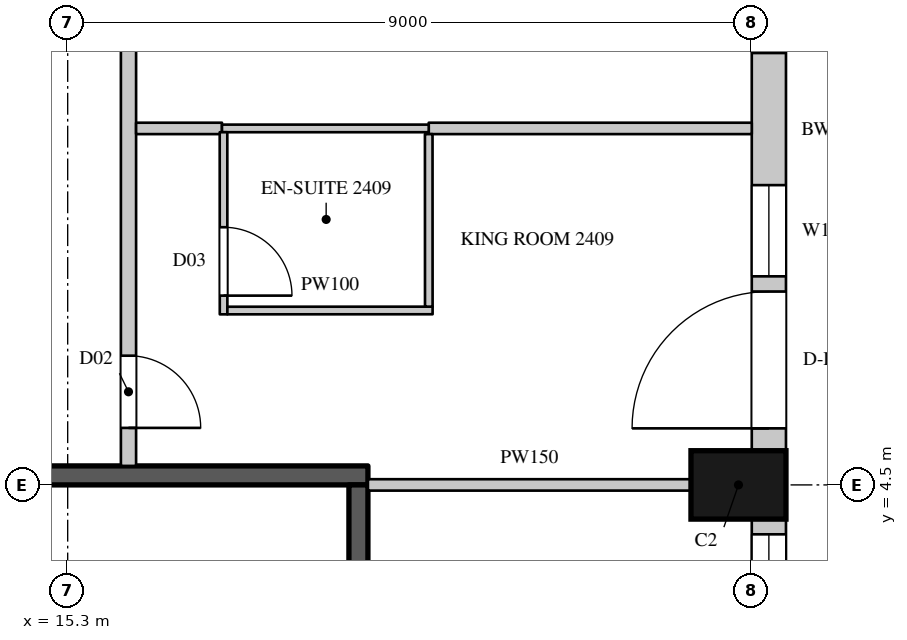
"""IFC4 building model, lengths in metres.
Left out: names, types, materials, properties, quantities, classifications, styles, units other than length and angle.
Written with IfcOpenShell. Run it as: python <this file> out.ifc"""

import sys

from ifc_helpers import new_model, si_unit, direction, frame, frame_2d, origin, origin_2d, place, context, subcontext, project, spatial, rectangle, extrude, element, fill, save


model = new_model("IFC4")
c1 = context("Model", 3, precision=1e-05, world=origin(), true_north=direction((0.0, 1.0)))
c2 = subcontext(c1, "Body", "Model", "MODEL_VIEW")
j1 = project(units=[si_unit("LENGTHUNIT", "METRE"), si_unit("PLANEANGLEUNIT", "RADIAN")], contexts=[c1])
p1 = place(None, origin())
s1 = spatial("IfcSite", under=j1, at=p1, CompositionType="ELEMENT")
p2 = place(p1, origin())
s2 = spatial("IfcBuilding", under=s1, at=p2, CompositionType="ELEMENT")
p3 = place(p2, frame((0.0, 0.0, 116.7)))
s3 = spatial("IfcBuildingStorey", under=s2, at=p3, CompositionType="ELEMENT", Elevation=116.7)
p4 = place(p3, frame((24.125, 4.5, 0.0), z_axis=(0.0, 0.0, 1.0), x_axis=(0.0, 1.0, 0.0)))
e1 = element("IfcColumn", 1, at=p4, inside=s3, PredefinedType="COLUMN", context=c2, shape_type="SweptSolid", body=[
    extrude(rectangle(XDim=0.9, YDim=1.25, at=origin_2d()), origin(), (0.0, 0.0, 1.0), 3.6),
])
p5 = place(p3, frame((24.525, -4.05, 0.0), z_axis=(0.0, 0.0, 1.0), x_axis=(0.0, 1.0, 0.0)))
e2 = element("IfcWall", 2, at=p5, inside=s3, PredefinedType="SOLIDWALL", context=c2, shape_type="SweptSolid", body=[
    extrude(rectangle(XDim=8.1, YDim=0.45, at=frame_2d((4.05, 0.0))), origin(), (0.0, 0.0, 1.0), 3.3),
])
p6 = place(p5, frame((0.2, 0.0, 0.0)))
e3 = element("IfcOpeningElement", 3, at=p6, cuts=e2, PredefinedType="OPENING", context=c2, shape_type="SweptSolid", body=[
    extrude(rectangle(XDim=1.8, YDim=2.4, at=frame_2d((0.9, 1.2))), frame((0.0, 0.235, 0.0), z_axis=(0.0, -1.0, 0.0), x_axis=(1.0, 0.0, 0.0)), (0.0, 0.0, 1.0), 0.47),
])
p7 = place(p5, frame((2.2, 0.0, 1.05)))
e4 = element("IfcOpeningElement", 4, at=p7, cuts=e2, PredefinedType="OPENING", context=c2, shape_type="SweptSolid", body=[
    extrude(rectangle(XDim=1.2, YDim=2.0, at=frame_2d((0.6, 1.0))), frame((0.0, 0.235, 0.0), z_axis=(0.0, -1.0, 0.0), x_axis=(1.0, 0.0, 0.0)), (0.0, 0.0, 1.0), 0.47),
])
p8 = place(p5, frame((4.7, 0.0, 0.0)))
e5 = element("IfcOpeningElement", 5, at=p8, cuts=e2, PredefinedType="OPENING", context=c2, shape_type="SweptSolid", body=[
    extrude(rectangle(XDim=1.8, YDim=2.4, at=frame_2d((0.9, 1.2))), frame((0.0, 0.235, 0.0), z_axis=(0.0, -1.0, 0.0), x_axis=(1.0, 0.0, 0.0)), (0.0, 0.0, 1.0), 0.47),
])
p9 = place(p5, frame((6.7, 0.0, 1.05)))
e6 = element("IfcOpeningElement", 6, at=p9, cuts=e2, PredefinedType="OPENING", context=c2, shape_type="SweptSolid", body=[
    extrude(rectangle(XDim=1.2, YDim=2.0, at=frame_2d((0.6, 1.0))), frame((0.0, 0.235, 0.0), z_axis=(0.0, -1.0, 0.0), x_axis=(1.0, 0.0, 0.0)), (0.0, 0.0, 1.0), 0.47),
])
p10 = place(p3, frame((24.525, 4.95, 0.0), z_axis=(0.0, 0.0, 1.0), x_axis=(0.0, 1.0, 0.0)))
e7 = element("IfcWall", 7, at=p10, inside=s3, PredefinedType="SOLIDWALL", context=c2, shape_type="SweptSolid", body=[
    extrude(rectangle(XDim=8.439, YDim=0.45, at=frame_2d((4.219, 0.0))), origin(), (0.0, 0.0, 1.0), 3.3),
])
p11 = place(p10, frame((0.294, 0.0, 0.0)))
e8 = element("IfcOpeningElement", 8, at=p11, cuts=e7, PredefinedType="OPENING", context=c2, shape_type="SweptSolid", body=[
    extrude(rectangle(XDim=1.8, YDim=2.4, at=frame_2d((0.9, 1.2))), frame((0.0, 0.235, 0.0), z_axis=(0.0, -1.0, 0.0), x_axis=(1.0, 0.0, 0.0)), (0.0, 0.0, 1.0), 0.47),
])
p12 = place(p10, frame((2.294, 0.0, 1.05)))
e9 = element("IfcOpeningElement", 9, at=p12, cuts=e7, PredefinedType="OPENING", context=c2, shape_type="SweptSolid", body=[
    extrude(rectangle(XDim=1.2, YDim=2.0, at=frame_2d((0.6, 1.0))), frame((0.0, 0.235, 0.0), z_axis=(0.0, -1.0, 0.0), x_axis=(1.0, 0.0, 0.0)), (0.0, 0.0, 1.0), 0.47),
])
p13 = place(p10, frame((5.232, 0.0, 1.05)))
e10 = element("IfcOpeningElement", 10, at=p13, cuts=e7, PredefinedType="OPENING", context=c2, shape_type="SweptSolid", body=[
    extrude(rectangle(XDim=2.7, YDim=2.0, at=frame_2d((1.35, 1.0))), frame((0.0, 0.235, 0.0), z_axis=(0.0, -1.0, 0.0), x_axis=(1.0, 0.0, 0.0)), (0.0, 0.0, 1.0), 0.47),
])
p14 = place(p3, frame((16.1, 4.75, 0.0), z_axis=(0.0, 0.0, 1.0), x_axis=(0.0, 1.0, 0.0)))
e11 = element("IfcWall", 11, at=p14, inside=s3, PredefinedType="PARTITIONING", context=c2, shape_type="SweptSolid", body=[
    extrude(rectangle(XDim=12.65, YDim=0.2, at=frame_2d((6.325, 0.0))), origin(), (0.0, 0.0, 1.0), 3.3),
])
p15 = place(p14, frame((0.5, 0.0, 0.0)))
e12 = element("IfcOpeningElement", 12, at=p15, cuts=e11, PredefinedType="OPENING", context=c2, shape_type="SweptSolid", body=[
    extrude(rectangle(XDim=0.95, YDim=2.2, at=frame_2d((0.475, 1.1))), frame((0.0, 0.11, 0.0), z_axis=(0.0, -1.0, 0.0), x_axis=(1.0, 0.0, 0.0)), (0.0, 0.0, 1.0), 0.22),
])
p16 = place(p14, frame((6.9, 0.0, 0.0)))
e13 = element("IfcOpeningElement", 13, at=p16, cuts=e11, PredefinedType="OPENING", context=c2, shape_type="SweptSolid", body=[
    extrude(rectangle(XDim=0.95, YDim=2.2, at=frame_2d((0.475, 1.1))), frame((0.0, 0.11, 0.0), z_axis=(0.0, -1.0, 0.0), x_axis=(1.0, 0.0, 0.0)), (0.0, 0.0, 1.0), 0.22),
])
p17 = place(p3, frame((16.2, 9.19, 0.0), z_axis=(0.0, 0.0, 1.0), x_axis=(1.0, 0.0, 0.0)))
e14 = element("IfcWall", 14, at=p17, inside=s3, PredefinedType="PARTITIONING", context=c2, shape_type="SweptSolid", body=[
    extrude(rectangle(XDim=1.13, YDim=0.15, at=frame_2d((0.565, 0.0))), origin(), (0.0, 0.0, 1.0), 2.65),
])
p18 = place(p3, frame((19.25, 4.5, 0.0), z_axis=(0.0, 0.0, 1.0), x_axis=(1.0, 0.0, 0.0)))
e15 = element("IfcWall", 15, at=p18, inside=s3, PredefinedType="PARTITIONING", context=c2, shape_type="SweptSolid", body=[
    extrude(rectangle(XDim=4.25, YDim=0.15, at=frame_2d((2.125, 0.0))), origin(), (0.0, 0.0, 1.0), 3.3),
])
p19 = place(p3, frame((20.05, 9.19, 0.0), z_axis=(0.0, 0.0, 1.0), x_axis=(1.0, 0.0, 0.0)))
e16 = element("IfcWall", 16, at=p19, inside=s3, PredefinedType="PARTITIONING", context=c2, shape_type="SweptSolid", body=[
    extrude(rectangle(XDim=4.25, YDim=0.15, at=frame_2d((2.125, 0.0))), origin(), (0.0, 0.0, 1.0), 2.65),
])
p20 = place(p3, frame((14.55, 4.625, 0.0), z_axis=(0.0, 0.0, 1.0), x_axis=(1.0, 0.0, 0.0)))
e17 = element("IfcWall", 17, at=p20, inside=s3, PredefinedType="SHEAR", context=c2, shape_type="SweptSolid", body=[
    extrude(rectangle(XDim=4.7, YDim=0.25, at=frame_2d((2.35, 0.0))), origin(), (0.0, 0.0, 1.0), 3.3),
])
p21 = place(p3, frame((19.125, -4.5, 0.0), z_axis=(0.0, 0.0, 1.0), x_axis=(0.0, 1.0, 0.0)))
e18 = element("IfcWall", 18, at=p21, inside=s3, PredefinedType="SHEAR", context=c2, shape_type="SweptSolid", body=[
    extrude(rectangle(XDim=9.0, YDim=0.25, at=frame_2d((4.5, 0.0))), origin(), (0.0, 0.0, 1.0), 3.3),
])
p22 = place(p3, frame((17.33, 9.19, 0.0), z_axis=(0.0, 0.0, 1.0), x_axis=(1.0, 0.0, 0.0)))
e19 = element("IfcWall", 19, at=p22, inside=s3, PredefinedType="PARTITIONING", context=c2, shape_type="SweptSolid", body=[
    extrude(rectangle(XDim=2.72, YDim=0.1, at=frame_2d((1.36, 0.0))), origin(), (0.0, 0.0, 1.0), 2.65),
])
p23 = place(p3, frame((17.35, 9.14, 0.0), z_axis=(0.0, 0.0, 1.0), x_axis=(0.000407580973, -0.999999916939, 0.0)))
e20 = element("IfcWall", 20, at=p23, inside=s3, PredefinedType="PARTITIONING", context=c2, shape_type="SweptSolid", body=[
    extrude(rectangle(XDim=2.396, YDim=0.1, at=frame_2d((1.198, 0.0))), origin(), (0.0, 0.0, 1.0), 3.3),
])
p24 = place(p23, frame((1.25, 0.0, 0.0)))
e21 = element("IfcOpeningElement", 21, at=p24, cuts=e20, PredefinedType="OPENING", context=c2, shape_type="SweptSolid", body=[
    extrude(rectangle(XDim=0.9, YDim=2.2, at=frame_2d((0.45, 1.1))), frame((0.0, 0.06, 0.0), z_axis=(0.0, -1.0, 0.0), x_axis=(1.0, 0.0, 0.0)), (0.0, 0.0, 1.0), 0.12),
])
p25 = place(p3, frame((17.401, 6.794, 0.0), z_axis=(0.0, 0.0, 1.0), x_axis=(0.9999999346, 0.000361663629, 0.0)))
e22 = element("IfcWall", 22, at=p25, inside=s3, PredefinedType="PARTITIONING", context=c2, shape_type="SweptSolid", body=[
    extrude(rectangle(XDim=2.7, YDim=0.1, at=frame_2d((1.35, 0.0))), origin(), (0.0, 0.0, 1.0), 3.3),
])
p26 = place(p3, frame((20.05, 9.115, 0.0), z_axis=(0.0, 0.0, 1.0), x_axis=(0.000430200003, -0.999999907464, 0.0)))
e23 = element("IfcWall", 23, at=p26, inside=s3, PredefinedType="PARTITIONING", context=c2, shape_type="SweptSolid", body=[
    extrude(rectangle(XDim=2.27, YDim=0.1, at=frame_2d((1.135, 0.0))), origin(), (0.0, 0.0, 1.0), 3.3),
])
p27 = place(p9, origin())
e24 = element("IfcWindow", 24, at=p27, inside=s3, PartitioningType="SINGLE_PANEL", PredefinedType="WINDOW", context=c2, shape_type="SweptSolid", body=[
    extrude(rectangle(XDim=1.2, YDim=2.0, at=frame_2d((0.6, 1.0))), frame((0.0, 0.135, 0.0), z_axis=(0.0, -1.0, 0.0), x_axis=(1.0, 0.0, 0.0)), (0.0, 0.0, 1.0), 0.06),
])
fill(e6, e24)
p28 = place(p11, origin())
e25 = element("IfcDoor", 25, at=p28, inside=s3, OperationType="SLIDING_TO_LEFT", PredefinedType="DOOR", context=c2, shape_type="SweptSolid", body=[
    extrude(rectangle(XDim=1.8, YDim=2.4, at=frame_2d((0.9, 1.2))), frame((0.0, 0.13, 0.0), z_axis=(0.0, -1.0, 0.0), x_axis=(1.0, 0.0, 0.0)), (0.0, 0.0, 1.0), 0.05),
])
fill(e8, e25)
p29 = place(p12, origin())
e26 = element("IfcWindow", 26, at=p29, inside=s3, PartitioningType="SINGLE_PANEL", PredefinedType="WINDOW", context=c2, shape_type="SweptSolid", body=[
    extrude(rectangle(XDim=1.2, YDim=2.0, at=frame_2d((0.6, 1.0))), frame((0.0, 0.135, 0.0), z_axis=(0.0, -1.0, 0.0), x_axis=(1.0, 0.0, 0.0)), (0.0, 0.0, 1.0), 0.06),
])
fill(e9, e26)
p30 = place(p13, origin())
e27 = element("IfcWindow", 27, at=p30, inside=s3, PartitioningType="SINGLE_PANEL", PredefinedType="WINDOW", context=c2, shape_type="SweptSolid", body=[
    extrude(rectangle(XDim=2.7, YDim=2.0, at=frame_2d((1.35, 1.0))), frame((0.0, 0.135, 0.0), z_axis=(0.0, -1.0, 0.0), x_axis=(1.0, 0.0, 0.0)), (0.0, 0.0, 1.0), 0.06),
])
fill(e10, e27)
p31 = place(p15, origin())
e28 = element("IfcDoor", 28, at=p31, inside=s3, OperationType="SINGLE_SWING_RIGHT", PredefinedType="DOOR", context=c2, shape_type="SweptSolid", body=[
    extrude(rectangle(XDim=0.95, YDim=2.2, at=frame_2d((0.475, 1.1))), frame((0.0, 0.025, 0.0), z_axis=(0.0, -1.0, 0.0), x_axis=(1.0, 0.0, 0.0)), (0.0, 0.0, 1.0), 0.05),
])
fill(e12, e28)
p32 = place(p24, origin())
e29 = element("IfcDoor", 29, at=p32, inside=s3, OperationType="SINGLE_SWING_RIGHT", PredefinedType="DOOR", context=c2, shape_type="SweptSolid", body=[
    extrude(rectangle(XDim=0.9, YDim=2.2, at=frame_2d((0.45, 1.1))), frame((0.0, 0.025, 0.0), z_axis=(0.0, -1.0, 0.0), x_axis=(1.0, 0.0, 0.0)), (0.0, 0.0, 1.0), 0.05),
])
fill(e21, e29)
save(model, sys.argv[1])
